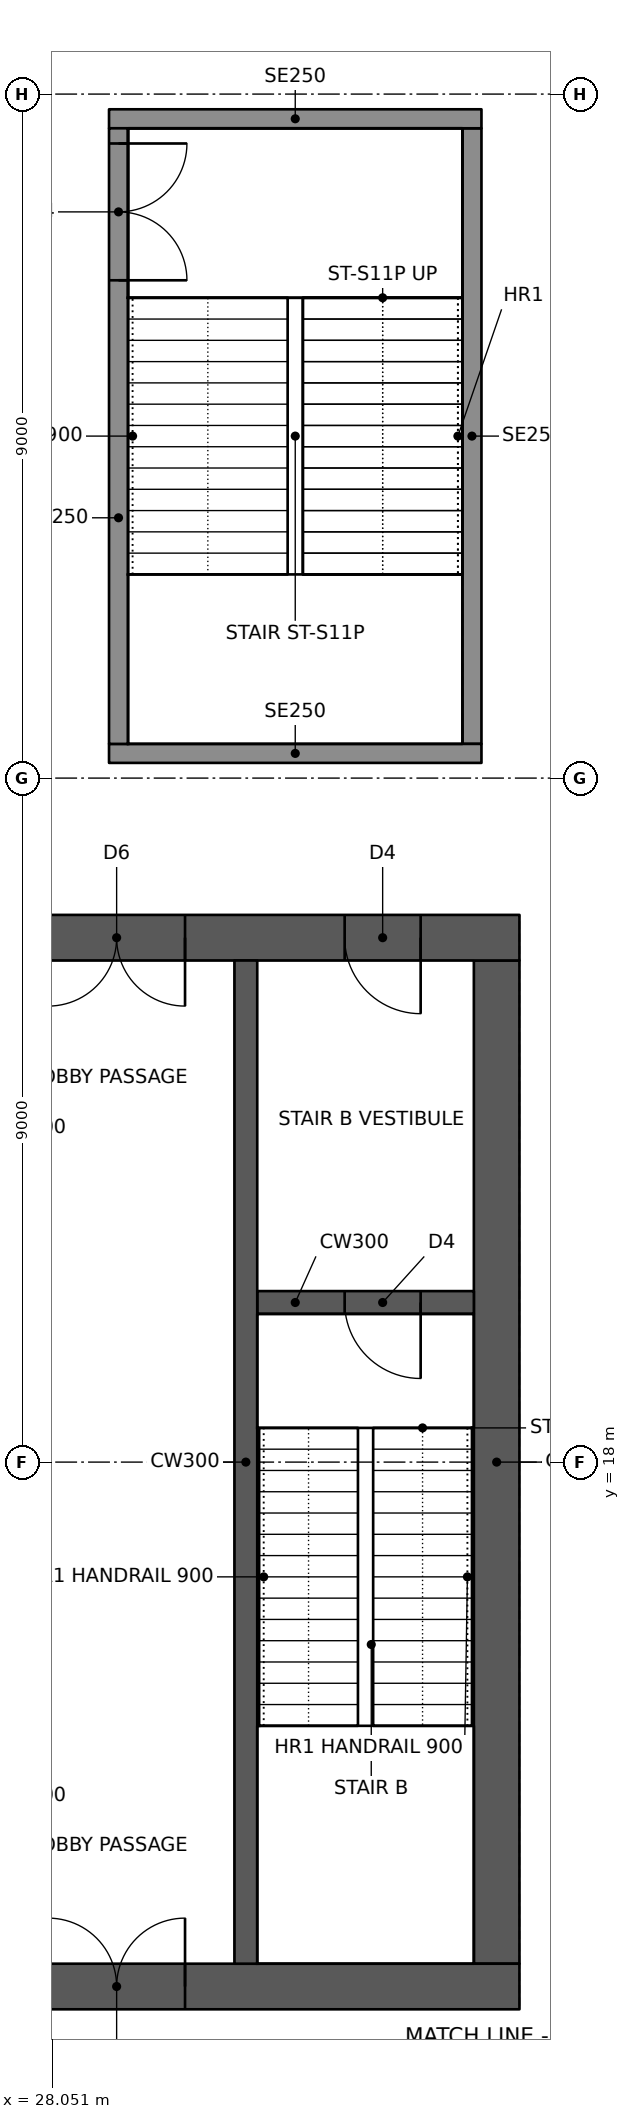
"""IFC4 building model, lengths in metres.
Left out: names, types, materials, properties, quantities, classifications, styles, units other than length and angle.
Written with IfcOpenShell. Run it as: python <this file> out.ifc"""

import sys

from ifc_helpers import new_model, si_unit, direction, frame, frame_2d, origin, place, context, subcontext, project, spatial, rectangle, extrude, element, fill, save


model = new_model("IFC4")
c1 = context("Model", 3, precision=1e-05, world=origin(), true_north=direction((0.0, 1.0)))
c2 = subcontext(c1, "Body", "Model", "MODEL_VIEW")
j1 = project(units=[si_unit("LENGTHUNIT", "METRE"), si_unit("PLANEANGLEUNIT", "RADIAN")], contexts=[c1])
p1 = place(None, origin())
s1 = spatial("IfcSite", under=j1, at=p1, CompositionType="ELEMENT")
p2 = place(p1, origin())
s2 = spatial("IfcBuilding", under=s1, at=p2, CompositionType="ELEMENT")
p3 = place(p2, frame((0.0, 0.0, 6.0)))
s3 = spatial("IfcBuildingStorey", under=s2, at=p3, CompositionType="ELEMENT", Elevation=6.0)
p4 = place(p3, frame((10.8, 11.1, 0.0), z_axis=(0.0, 0.0, 1.0), x_axis=(1.0, 0.0, 0.0)))
e1 = element("IfcWall", 1, at=p4, inside=s3, PredefinedType="SHEAR", context=c2, shape_type="SweptSolid", body=[
    extrude(rectangle(XDim=23.4, YDim=0.6, at=frame_2d((11.7, 0.0))), origin(), (0.0, 0.0, 1.0), 5.0),
])
p5 = place(p4, frame((1.0, 0.0, 0.0)))
e2 = element("IfcOpeningElement", 2, at=p5, cuts=e1, PredefinedType="OPENING", context=c2, shape_type="SweptSolid", body=[
    extrude(rectangle(XDim=1.0, YDim=2.1, at=frame_2d((0.5, 1.05))), frame((0.0, 0.31, 0.0), z_axis=(0.0, -1.0, 0.0), x_axis=(1.0, 0.0, 0.0)), (0.0, 0.0, 1.0), 0.62),
])
p6 = place(p4, frame((17.2, 0.0, 0.0)))
e3 = element("IfcOpeningElement", 3, at=p6, cuts=e1, PredefinedType="OPENING", context=c2, shape_type="SweptSolid", body=[
    extrude(rectangle(XDim=1.8, YDim=2.1, at=frame_2d((0.9, 1.05))), frame((0.0, 0.31, 0.0), z_axis=(0.0, -1.0, 0.0), x_axis=(1.0, 0.0, 0.0)), (0.0, 0.0, 1.0), 0.62),
])
p7 = place(p3, frame((10.8, 24.9, 0.0), z_axis=(0.0, 0.0, 1.0), x_axis=(1.0, 0.0, 0.0)))
e4 = element("IfcWall", 4, at=p7, inside=s3, PredefinedType="SHEAR", context=c2, shape_type="SweptSolid", body=[
    extrude(rectangle(XDim=23.4, YDim=0.6, at=frame_2d((11.7, 0.0))), origin(), (0.0, 0.0, 1.0), 5.0),
])
p8 = place(p7, frame((17.2, 0.0, 0.0)))
e5 = element("IfcOpeningElement", 5, at=p8, cuts=e4, PredefinedType="OPENING", context=c2, shape_type="SweptSolid", body=[
    extrude(rectangle(XDim=1.8, YDim=2.1, at=frame_2d((0.9, 1.05))), frame((0.0, 0.31, 0.0), z_axis=(0.0, -1.0, 0.0), x_axis=(1.0, 0.0, 0.0)), (0.0, 0.0, 1.0), 0.62),
])
p9 = place(p7, frame((21.1, 0.0, 0.0)))
e6 = element("IfcOpeningElement", 6, at=p9, cuts=e4, PredefinedType="OPENING", context=c2, shape_type="SweptSolid", body=[
    extrude(rectangle(XDim=1.0, YDim=2.1, at=frame_2d((0.5, 1.05))), frame((0.0, 0.31, 0.0), z_axis=(0.0, -1.0, 0.0), x_axis=(1.0, 0.0, 0.0)), (0.0, 0.0, 1.0), 0.62),
])
p10 = place(p3, frame((33.9, 11.4, 0.0), z_axis=(0.0, 0.0, 1.0), x_axis=(0.0, 1.0, 0.0)))
e7 = element("IfcWall", 7, at=p10, inside=s3, PredefinedType="SHEAR", context=c2, shape_type="SweptSolid", body=[
    extrude(rectangle(XDim=13.2, YDim=0.6, at=frame_2d((6.6, 0.0))), origin(), (0.0, 0.0, 1.0), 5.0),
])
p11 = place(p3, frame((30.6, 11.4, 0.0), z_axis=(0.0, 0.0, 1.0), x_axis=(0.0, 1.0, 0.0)))
e8 = element("IfcWall", 8, at=p11, inside=s3, PredefinedType="SHEAR", context=c2, shape_type="SweptSolid", body=[
    extrude(rectangle(XDim=13.2, YDim=0.3, at=frame_2d((6.6, 0.0))), origin(), (0.0, 0.0, 1.0), 5.0),
])
p12 = place(p3, frame((30.75, 20.1, 0.0), z_axis=(0.0, 0.0, 1.0), x_axis=(1.0, 0.0, 0.0)))
e9 = element("IfcWall", 9, at=p12, inside=s3, PredefinedType="SHEAR", context=c2, shape_type="SweptSolid", body=[
    extrude(rectangle(XDim=2.85, YDim=0.3, at=frame_2d((1.425, 0.0))), origin(), (0.0, 0.0, 1.0), 5.0),
])
p13 = place(p12, frame((1.15, 0.0, 0.0)))
e10 = element("IfcOpeningElement", 10, at=p13, cuts=e9, PredefinedType="OPENING", context=c2, shape_type="SweptSolid", body=[
    extrude(rectangle(XDim=1.0, YDim=2.1, at=frame_2d((0.5, 1.05))), frame((0.0, 0.16, 0.0), z_axis=(0.0, -1.0, 0.0), x_axis=(1.0, 0.0, 0.0)), (0.0, 0.0, 1.0), 0.32),
])
for number, where, z_axis, x_axis in (
    (11, (28.8, 27.325, 0.0), (0.0, 0.0, 1.0), (1.0, 0.0, 0.0)),
    (12, (28.8, 35.675, 0.0), (0.0, 0.0, 1.0), (1.0, 0.0, 0.0)),
):
    element("IfcWall", number, at=place(p3, frame(where, z_axis=z_axis, x_axis=x_axis)), inside=s3, PredefinedType="SOLIDWALL", context=c2, shape_type="SweptSolid", body=[
        extrude(rectangle(XDim=4.9, YDim=0.25, at=frame_2d((2.45, 0.0))), origin(), (0.0, 0.0, 1.0), 4.75),
    ])
p14 = place(p3, frame((28.925, 27.45, 0.0), z_axis=(0.0, 0.0, 1.0), x_axis=(0.0, 1.0, 0.0)))
e13 = element("IfcWall", 13, at=p14, inside=s3, PredefinedType="SOLIDWALL", context=c2, shape_type="SweptSolid", body=[
    extrude(rectangle(XDim=8.1, YDim=0.25, at=frame_2d((4.05, 0.0))), origin(), (0.0, 0.0, 1.0), 4.75),
])
p15 = place(p14, frame((6.1, 0.0, 0.0)))
e14 = element("IfcOpeningElement", 14, at=p15, cuts=e13, PredefinedType="OPENING", context=c2, shape_type="SweptSolid", body=[
    extrude(rectangle(XDim=1.8, YDim=2.1, at=frame_2d((0.9, 1.05))), frame((0.0, 0.135, 0.0), z_axis=(0.0, -1.0, 0.0), x_axis=(1.0, 0.0, 0.0)), (0.0, 0.0, 1.0), 0.27),
])
p16 = place(p3, frame((33.575, 27.45, 0.0), z_axis=(0.0, 0.0, 1.0), x_axis=(0.0, 1.0, 0.0)))
e15 = element("IfcWall", 15, at=p16, inside=s3, PredefinedType="SOLIDWALL", context=c2, shape_type="SweptSolid", body=[
    extrude(rectangle(XDim=8.1, YDim=0.25, at=frame_2d((4.05, 0.0))), origin(), (0.0, 0.0, 1.0), 4.75),
])
p17 = place(p6, origin())
e16 = element("IfcDoor", 16, at=p17, inside=s3, OperationType="DOUBLE_DOOR_SINGLE_SWING", PredefinedType="DOOR", context=c2, shape_type="SweptSolid", body=[
    extrude(rectangle(XDim=1.8, YDim=2.1, at=frame_2d((0.9, 1.05))), frame((0.0, 0.025, 0.0), z_axis=(0.0, -1.0, 0.0), x_axis=(1.0, 0.0, 0.0)), (0.0, 0.0, 1.0), 0.05),
])
fill(e3, e16)
p18 = place(p8, frame((1.8, 0.0, 0.0), z_axis=(0.0, 0.0, 1.0), x_axis=(-1.0, 0.0, 0.0)))
e17 = element("IfcDoor", 17, at=p18, inside=s3, OperationType="DOUBLE_DOOR_SINGLE_SWING", PredefinedType="DOOR", context=c2, shape_type="SweptSolid", body=[
    extrude(rectangle(XDim=1.8, YDim=2.1, at=frame_2d((0.9, 1.05))), frame((0.0, 0.025, 0.0), z_axis=(0.0, -1.0, 0.0), x_axis=(1.0, 0.0, 0.0)), (0.0, 0.0, 1.0), 0.05),
])
fill(e5, e17)
p19 = place(p9, frame((1.0, 0.0, 0.0), z_axis=(0.0, 0.0, 1.0), x_axis=(-1.0, 0.0, 0.0)))
e18 = element("IfcDoor", 18, at=p19, inside=s3, OperationType="SINGLE_SWING_LEFT", PredefinedType="DOOR", context=c2, shape_type="SweptSolid", body=[
    extrude(rectangle(XDim=1.0, YDim=2.1, at=frame_2d((0.5, 1.05))), frame((0.0, 0.025, 0.0), z_axis=(0.0, -1.0, 0.0), x_axis=(1.0, 0.0, 0.0)), (0.0, 0.0, 1.0), 0.05),
])
fill(e6, e18)
p20 = place(p13, frame((1.0, 0.0, 0.0), z_axis=(0.0, 0.0, 1.0), x_axis=(-1.0, 0.0, 0.0)))
e19 = element("IfcDoor", 19, at=p20, inside=s3, OperationType="SINGLE_SWING_LEFT", PredefinedType="DOOR", context=c2, shape_type="SweptSolid", body=[
    extrude(rectangle(XDim=1.0, YDim=2.1, at=frame_2d((0.5, 1.05))), frame((0.0, 0.025, 0.0), z_axis=(0.0, -1.0, 0.0), x_axis=(1.0, 0.0, 0.0)), (0.0, 0.0, 1.0), 0.05),
])
fill(e10, e19)
p21 = place(p15, frame((1.8, 0.0, 0.0), z_axis=(0.0, 0.0, 1.0), x_axis=(-1.0, 0.0, 0.0)))
e20 = element("IfcDoor", 20, at=p21, inside=s3, OperationType="DOUBLE_DOOR_SINGLE_SWING", PredefinedType="DOOR", context=c2, shape_type="SweptSolid", body=[
    extrude(rectangle(XDim=1.8, YDim=2.1, at=frame_2d((0.9, 1.05))), frame((0.0, 0.025, 0.0), z_axis=(0.0, -1.0, 0.0), x_axis=(1.0, 0.0, 0.0)), (0.0, 0.0, 1.0), 0.05),
])
fill(e14, e20)
save(model, sys.argv[1])
